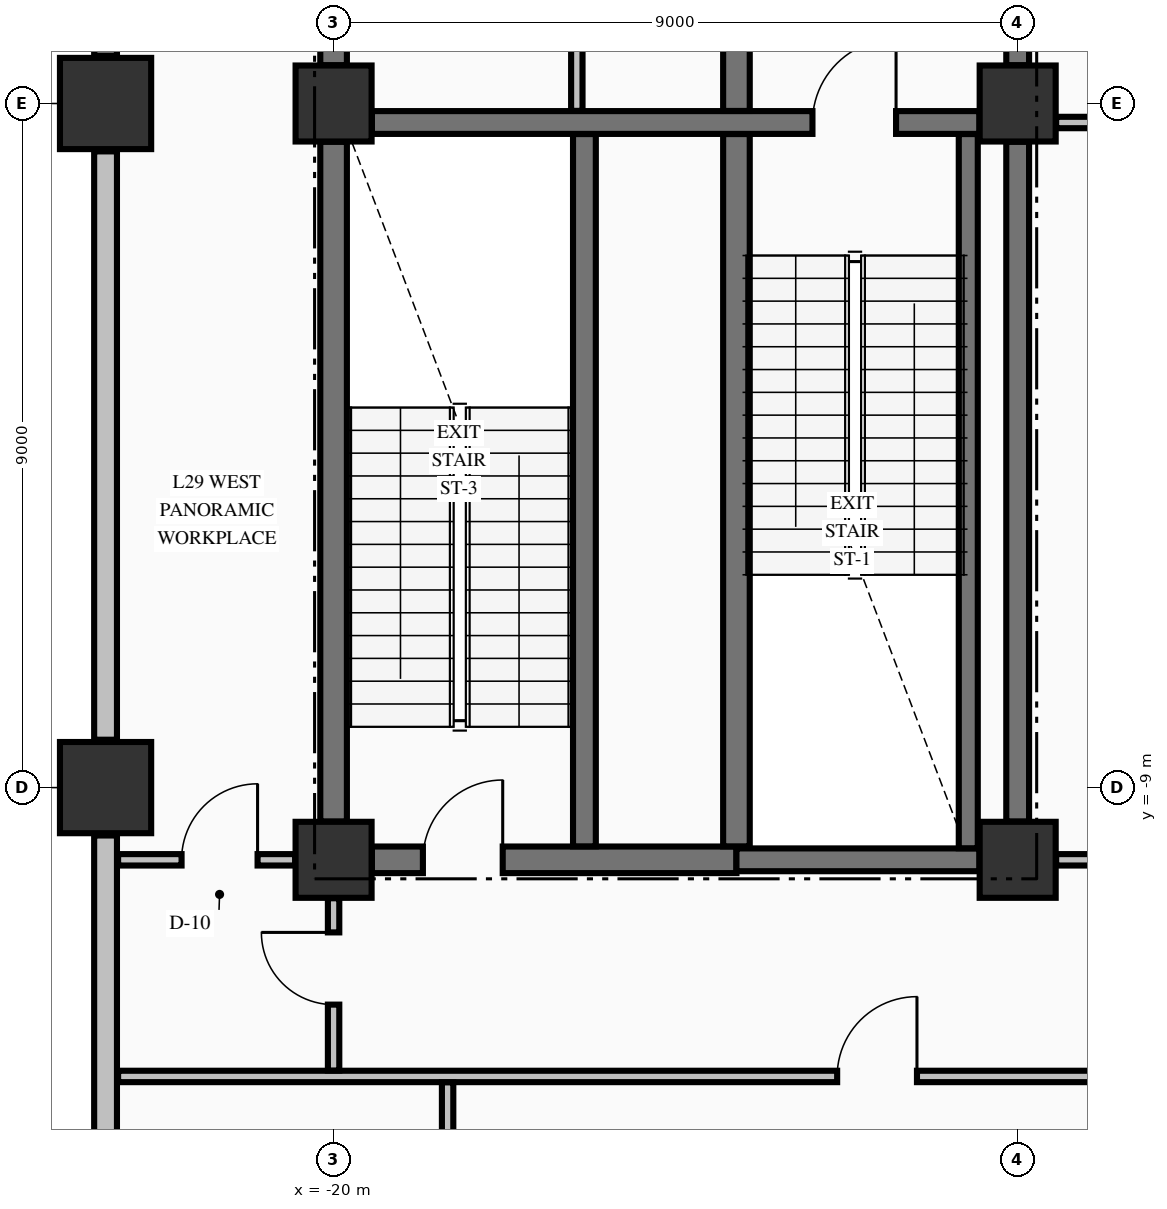
"""IFC4 building model, lengths in metres.
Left out: names, types, materials, properties, quantities, classifications, styles, units other than length and angle.
Written with IfcOpenShell. Run it as: python <this file> out.ifc"""

import sys

from ifc_helpers import new_model, si_unit, direction, frame, frame_2d, origin, origin_2d, place, context, subcontext, project, spatial, rectangle, extrude, element, fill, save


model = new_model("IFC4")
c1 = context("Model", 3, precision=1e-05, world=origin(), true_north=direction((0.0, 1.0)))
c2 = subcontext(c1, "Body", "Model", "MODEL_VIEW")
j1 = project(units=[si_unit("LENGTHUNIT", "METRE"), si_unit("PLANEANGLEUNIT", "RADIAN")], contexts=[c1])
p1 = place(None, origin())
s1 = spatial("IfcSite", under=j1, at=p1, CompositionType="ELEMENT")
p2 = place(p1, origin())
s2 = spatial("IfcBuilding", under=s1, at=p2, CompositionType="ELEMENT")
p3 = place(p2, frame((0.0, 0.0, 116.35)))
s3 = spatial("IfcBuildingStorey", under=s2, at=p3, CompositionType="ELEMENT", Elevation=116.35)
for number, where, z_axis, x_axis in (
    (1, (-23.0, -9.0, -0.425), (0.0, 0.0, 1.0), (1.0, 0.0, 0.0)),
    (2, (-23.0, 0.0, -0.425), (0.0, 0.0, 1.0), (1.0, 0.0, 0.0)),
):
    element("IfcColumn", number, at=place(p3, frame(where, z_axis=z_axis, x_axis=x_axis)), inside=s3, PredefinedType="COLUMN", context=c2, shape_type="SweptSolid", body=[
        extrude(rectangle(XDim=1.2, YDim=1.2, at=origin_2d()), origin(), (0.0, 0.0, 1.0), 5.0),
    ])
for number, where, z_axis, x_axis in (
    (3, (-20.0, -9.95, -0.425), (0.0, 0.0, 1.0), (1.0, 0.0, 0.0)),
    (4, (-11.0, -9.95, -0.425), (0.0, 0.0, 1.0), (1.0, 0.0, 0.0)),
    (5, (-11.0, 0.0, -0.425), (0.0, 0.0, 1.0), (1.0, 0.0, 0.0)),
    (6, (-20.0, 0.0, -0.425), (0.0, 0.0, 1.0), (1.0, 0.0, 0.0)),
):
    element("IfcColumn", number, at=place(p3, frame(where, z_axis=z_axis, x_axis=x_axis)), inside=s3, PredefinedType="COLUMN", context=c2, shape_type="SweptSolid", body=[
        extrude(rectangle(XDim=1.0, YDim=1.0, at=origin_2d()), origin(), (0.0, 0.0, 1.0), 5.0),
    ])
p4 = place(p3, frame((-23.0, -9.63, 0.0), z_axis=(0.0, 0.0, 1.0), x_axis=(0.0, -1.0, 0.0)))
e7 = element("IfcWall", 7, at=p4, inside=s3, PredefinedType="STANDARD", context=c2, shape_type="SweptSolid", body=[
    extrude(rectangle(XDim=10.74, YDim=0.3, at=frame_2d((5.37, 0.0))), origin(), (0.0, 0.0, 1.0), 2.167),
])
for number, where, z_axis, x_axis in (
    (8, (-23.0, -0.63, 0.0), (0.0, 0.0, 1.0), (0.0, -1.0, 0.0)),
    (9, (-23.0, 8.37, 0.0), (0.0, 0.0, 1.0), (0.0, -1.0, 0.0)),
):
    element("IfcWall", number, at=place(p3, frame(where, z_axis=z_axis, x_axis=x_axis)), inside=s3, PredefinedType="STANDARD", context=c2, shape_type="SweptSolid", body=[
        extrude(rectangle(XDim=7.74, YDim=0.3, at=frame_2d((3.87, 0.0))), origin(), (0.0, 0.0, 1.0), 2.167),
    ])
p5 = place(p3, frame((-19.496, -9.95, 0.0), z_axis=(0.0, 0.0, 1.0), x_axis=(1.0, 0.0, 0.0)))
e10 = element("IfcWall", 10, at=p5, inside=s3, PredefinedType="SHEAR", context=c2, shape_type="SweptSolid", body=[
    extrude(rectangle(XDim=4.796, YDim=0.35, at=frame_2d((2.398, 0.0))), origin(), (0.0, 0.0, 1.0), 4.575),
])
p6 = place(p5, frame((0.671, 0.0, 0.0)))
e11 = element("IfcOpeningElement", 11, at=p6, cuts=e10, PredefinedType="OPENING", context=c2, shape_type="SweptSolid", body=[
    extrude(rectangle(XDim=1.05, YDim=2.15, at=frame_2d((0.525, 1.075))), frame((0.0, 0.185, 0.0), z_axis=(0.0, -1.0, 0.0), x_axis=(1.0, 0.0, 0.0)), (0.0, 0.0, 1.0), 0.37),
])
p7 = place(p3, frame((-14.7, -9.95, 0.0), z_axis=(0.0, 0.0, 1.0), x_axis=(1.0, 0.0, 0.0)))
e12 = element("IfcWall", 12, at=p7, inside=s3, PredefinedType="SHEAR", context=c2, shape_type="SweptSolid", body=[
    extrude(rectangle(XDim=3.196, YDim=0.3, at=frame_2d((1.598, 0.0))), origin(), (0.0, 0.0, 1.0), 4.575),
])
p8 = place(p3, frame((-19.496, -0.25, 0.0), z_axis=(0.0, 0.0, 1.0), x_axis=(1.0, 0.0, 0.0)))
e13 = element("IfcWall", 13, at=p8, inside=s3, PredefinedType="SHEAR", context=c2, shape_type="SweptSolid", body=[
    extrude(rectangle(XDim=7.992, YDim=0.3, at=frame_2d((3.996, 0.0))), origin(), (0.0, 0.0, 1.0), 4.575),
])
p9 = place(p8, frame((5.796, 0.0, 0.0)))
e14 = element("IfcOpeningElement", 14, at=p9, cuts=e13, PredefinedType="OPENING", context=c2, shape_type="SweptSolid", body=[
    extrude(rectangle(XDim=1.1, YDim=2.15, at=frame_2d((0.55, 1.075))), frame((0.0, 0.16, 0.0), z_axis=(0.0, -1.0, 0.0), x_axis=(1.0, 0.0, 0.0)), (0.0, 0.0, 1.0), 0.32),
])
p10 = place(p3, frame((-22.835, -12.8, 0.0), z_axis=(0.0, 0.0, 1.0), x_axis=(1.0, 0.0, 0.0)))
e15 = element("IfcWall", 15, at=p10, inside=s3, PredefinedType="PARTITIONING", context=c2, shape_type="SweptSolid", body=[
    extrude(rectangle(XDim=50.67, YDim=0.15, at=frame_2d((25.335, 0.0))), origin(), (0.0, 0.0, 1.0), 4.575),
])
p11 = place(p10, frame((9.46, 0.0, 0.0)))
e16 = element("IfcOpeningElement", 16, at=p11, cuts=e15, PredefinedType="OPENING", context=c2, shape_type="SweptSolid", body=[
    extrude(rectangle(XDim=1.05, YDim=2.15, at=frame_2d((0.525, 1.075))), frame((0.0, 0.085, 0.0), z_axis=(0.0, -1.0, 0.0), x_axis=(1.0, 0.0, 0.0)), (0.0, 0.0, 1.0), 0.17),
])
p12 = place(p10, frame((17.86, 0.0, 0.0)))
e17 = element("IfcOpeningElement", 17, at=p12, cuts=e15, PredefinedType="OPENING", context=c2, shape_type="SweptSolid", body=[
    extrude(rectangle(XDim=0.95, YDim=2.15, at=frame_2d((0.475, 1.075))), frame((0.0, 0.085, 0.0), z_axis=(0.0, -1.0, 0.0), x_axis=(1.0, 0.0, 0.0)), (0.0, 0.0, 1.0), 0.17),
])
p13 = place(p10, frame((22.21, 0.0, 0.0)))
e18 = element("IfcOpeningElement", 18, at=p13, cuts=e15, PredefinedType="OPENING", context=c2, shape_type="SweptSolid", body=[
    extrude(rectangle(XDim=0.95, YDim=2.02, at=frame_2d((0.475, 1.01))), frame((0.0, 0.085, 0.0), z_axis=(0.0, -1.0, 0.0), x_axis=(1.0, 0.0, 0.0)), (0.0, 0.0, 1.0), 0.17),
])
p14 = place(p10, frame((31.51, 0.0, 0.0)))
e19 = element("IfcOpeningElement", 19, at=p14, cuts=e15, PredefinedType="OPENING", context=c2, shape_type="SweptSolid", body=[
    extrude(rectangle(XDim=1.05, YDim=2.15, at=frame_2d((0.525, 1.075))), frame((0.0, 0.085, 0.0), z_axis=(0.0, -1.0, 0.0), x_axis=(1.0, 0.0, 0.0)), (0.0, 0.0, 1.0), 0.17),
])
p15 = place(p10, frame((39.11, 0.0, 0.0)))
e20 = element("IfcOpeningElement", 20, at=p15, cuts=e15, PredefinedType="OPENING", context=c2, shape_type="SweptSolid", body=[
    extrude(rectangle(XDim=1.05, YDim=2.15, at=frame_2d((0.525, 1.075))), frame((0.0, 0.085, 0.0), z_axis=(0.0, -1.0, 0.0), x_axis=(1.0, 0.0, 0.0)), (0.0, 0.0, 1.0), 0.17),
])
p16 = place(p3, frame((-22.835, -9.95, 0.0), z_axis=(0.0, 0.0, 1.0), x_axis=(1.0, 0.0, 0.0)))
e21 = element("IfcWall", 21, at=p16, inside=s3, PredefinedType="PARTITIONING", context=c2, shape_type="SweptSolid", body=[
    extrude(rectangle(XDim=2.329, YDim=0.15, at=frame_2d((1.165, 0.0))), origin(), (0.0, 0.0, 1.0), 4.575),
])
p17 = place(p16, frame((0.835, 0.0, 0.0)))
e22 = element("IfcOpeningElement", 22, at=p17, cuts=e21, PredefinedType="OPENING", context=c2, shape_type="SweptSolid", body=[
    extrude(rectangle(XDim=1.0, YDim=2.15, at=frame_2d((0.5, 1.075))), frame((0.0, 0.085, 0.0), z_axis=(0.0, -1.0, 0.0), x_axis=(1.0, 0.0, 0.0)), (0.0, 0.0, 1.0), 0.17),
])
p18 = place(p3, frame((-10.494, -9.95, 0.0), z_axis=(0.0, 0.0, 1.0), x_axis=(1.0, 0.0, 0.0)))
e23 = element("IfcWall", 23, at=p18, inside=s3, PredefinedType="PARTITIONING", context=c2, shape_type="SweptSolid", body=[
    extrude(rectangle(XDim=20.988, YDim=0.15, at=frame_2d((10.494, 0.0))), origin(), (0.0, 0.0, 1.0), 4.575),
])
p19 = place(p18, frame((15.394, 0.0, 0.0)))
e24 = element("IfcOpeningElement", 24, at=p19, cuts=e23, PredefinedType="OPENING", context=c2, shape_type="SweptSolid", body=[
    extrude(rectangle(XDim=1.1, YDim=2.15, at=frame_2d((0.55, 1.075))), frame((0.0, 0.085, 0.0), z_axis=(0.0, -1.0, 0.0), x_axis=(1.0, 0.0, 0.0)), (0.0, 0.0, 1.0), 0.17),
])
p20 = place(p18, frame((19.888, 0.0, 0.0)))
e25 = element("IfcOpeningElement", 25, at=p20, cuts=e23, PredefinedType="OPENING", context=c2, shape_type="SweptSolid", body=[
    extrude(rectangle(XDim=0.95, YDim=2.02, at=frame_2d((0.475, 1.01))), frame((0.0, 0.085, 0.0), z_axis=(0.0, -1.0, 0.0), x_axis=(1.0, 0.0, 0.0)), (0.0, 0.0, 1.0), 0.17),
])
p21 = place(p3, frame((-10.494, -0.25, 0.0), z_axis=(0.0, 0.0, 1.0), x_axis=(1.0, 0.0, 0.0)))
e26 = element("IfcWall", 26, at=p21, inside=s3, PredefinedType="PARTITIONING", context=c2, shape_type="SweptSolid", body=[
    extrude(rectangle(XDim=20.988, YDim=0.15, at=frame_2d((10.494, 0.0))), origin(), (0.0, 0.0, 1.0), 4.575),
])
p22 = place(p21, frame((15.394, 0.0, 0.0)))
e27 = element("IfcOpeningElement", 27, at=p22, cuts=e26, PredefinedType="OPENING", context=c2, shape_type="SweptSolid", body=[
    extrude(rectangle(XDim=1.1, YDim=2.15, at=frame_2d((0.55, 1.075))), frame((0.0, 0.085, 0.0), z_axis=(0.0, -1.0, 0.0), x_axis=(1.0, 0.0, 0.0)), (0.0, 0.0, 1.0), 0.17),
])
p23 = place(p21, frame((6.639, 0.0, 0.0)))
e28 = element("IfcOpeningElement", 28, at=p23, cuts=e26, PredefinedType="OPENING", context=c2, shape_type="SweptSolid", body=[
    extrude(rectangle(XDim=1.05, YDim=2.15, at=frame_2d((0.525, 1.075))), frame((0.0, 0.085, 0.0), z_axis=(0.0, -1.0, 0.0), x_axis=(1.0, 0.0, 0.0)), (0.0, 0.0, 1.0), 0.17),
])
p24 = place(p21, frame((18.799, 0.0, 0.0)))
e29 = element("IfcOpeningElement", 29, at=p24, cuts=e26, PredefinedType="OPENING", context=c2, shape_type="SweptSolid", body=[
    extrude(rectangle(XDim=0.95, YDim=2.15, at=frame_2d((0.475, 1.075))), frame((0.0, 0.085, 0.0), z_axis=(0.0, -1.0, 0.0), x_axis=(1.0, 0.0, 0.0)), (0.0, 0.0, 1.0), 0.17),
])
p25 = place(p3, frame((-20.0, -9.446, 0.0), z_axis=(0.0, 0.0, 1.0), x_axis=(0.0, 1.0, 0.0)))
e30 = element("IfcWall", 30, at=p25, inside=s3, PredefinedType="SHEAR", context=c2, shape_type="SweptSolid", body=[
    extrude(rectangle(XDim=8.942, YDim=0.35, at=frame_2d((4.471, 0.0))), origin(), (0.0, 0.0, 1.0), 4.575),
])
p26 = place(p3, frame((-20.0, 0.504, 0.0), z_axis=(0.0, 0.0, 1.0), x_axis=(0.0, 1.0, 0.0)))
e31 = element("IfcWall", 31, at=p26, inside=s3, PredefinedType="SHEAR", context=c2, shape_type="SweptSolid", body=[
    extrude(rectangle(XDim=9.492, YDim=0.35, at=frame_2d((4.746, 0.0))), origin(), (0.0, 0.0, 1.0), 4.575),
])
p27 = place(p3, frame((-16.7, -9.773, 0.0), z_axis=(0.0, 0.0, 1.0), x_axis=(0.0, 1.0, 0.0)))
e32 = element("IfcWall", 32, at=p27, inside=s3, PredefinedType="SHEAR", context=c2, shape_type="SweptSolid", body=[
    extrude(rectangle(XDim=9.371, YDim=0.3, at=frame_2d((4.686, 0.0))), origin(), (0.0, 0.0, 1.0), 4.575),
])
p28 = place(p3, frame((-14.7, -9.773, 0.0), z_axis=(0.0, 0.0, 1.0), x_axis=(0.0, 1.0, 0.0)))
e33 = element("IfcWall", 33, at=p28, inside=s3, PredefinedType="SHEAR", context=c2, shape_type="SweptSolid", body=[
    extrude(rectangle(XDim=9.371, YDim=0.35, at=frame_2d((4.686, 0.0))), origin(), (0.0, 0.0, 1.0), 4.575),
])
p29 = place(p3, frame((-14.7, -0.098, 0.0), z_axis=(0.0, 0.0, 1.0), x_axis=(0.0, 1.0, 0.0)))
e34 = element("IfcWall", 34, at=p29, inside=s3, PredefinedType="SHEAR", context=c2, shape_type="SweptSolid", body=[
    extrude(rectangle(XDim=2.846, YDim=0.35, at=frame_2d((1.423, 0.0))), origin(), (0.0, 0.0, 1.0), 4.575),
])
p30 = place(p3, frame((-11.65, -9.798, 0.0), z_axis=(0.0, 0.0, 1.0), x_axis=(0.0, 1.0, 0.0)))
e35 = element("IfcWall", 35, at=p30, inside=s3, PredefinedType="SOLIDWALL", context=c2, shape_type="SweptSolid", body=[
    extrude(rectangle(XDim=9.396, YDim=0.25, at=frame_2d((4.698, 0.0))), origin(), (0.0, 0.0, 1.0), 4.575),
])
p31 = place(p3, frame((-11.0, -9.446, 0.0), z_axis=(0.0, 0.0, 1.0), x_axis=(0.0, 1.0, 0.0)))
e36 = element("IfcWall", 36, at=p31, inside=s3, PredefinedType="SHEAR", context=c2, shape_type="SweptSolid", body=[
    extrude(rectangle(XDim=8.942, YDim=0.3, at=frame_2d((4.471, 0.0))), origin(), (0.0, 0.0, 1.0), 4.575),
])
p32 = place(p3, frame((-11.0, 0.504, 0.0), z_axis=(0.0, 0.0, 1.0), x_axis=(0.0, 1.0, 0.0)))
e37 = element("IfcWall", 37, at=p32, inside=s3, PredefinedType="SHEAR", context=c2, shape_type="SweptSolid", body=[
    extrude(rectangle(XDim=2.244, YDim=0.3, at=frame_2d((1.122, 0.0))), origin(), (0.0, 0.0, 1.0), 4.575),
])
p33 = place(p32, frame((0.596, 0.0, 0.0)))
e38 = element("IfcOpeningElement", 38, at=p33, cuts=e37, PredefinedType="OPENING", context=c2, shape_type="SweptSolid", body=[
    extrude(rectangle(XDim=1.1, YDim=2.15, at=frame_2d((0.55, 1.075))), frame((0.0, 0.16, 0.0), z_axis=(0.0, -1.0, 0.0), x_axis=(1.0, 0.0, 0.0)), (0.0, 0.0, 1.0), 0.32),
])
p34 = place(p3, frame((-20.0, -12.722, 0.0), z_axis=(0.0, 0.0, 1.0), x_axis=(0.0, 1.0, 0.0)))
e39 = element("IfcWall", 39, at=p34, inside=s3, PredefinedType="PARTITIONING", context=c2, shape_type="SweptSolid", body=[
    extrude(rectangle(XDim=2.266, YDim=0.15, at=frame_2d((1.133, 0.0))), origin(), (0.0, 0.0, 1.0), 4.065),
])
p35 = place(p34, frame((0.867, 0.0, 0.0)))
e40 = element("IfcOpeningElement", 40, at=p35, cuts=e39, PredefinedType="OPENING", context=c2, shape_type="SweptSolid", body=[
    extrude(rectangle(XDim=0.95, YDim=2.02, at=frame_2d((0.475, 1.01))), frame((0.0, 0.085, 0.0), z_axis=(0.0, -1.0, 0.0), x_axis=(1.0, 0.0, 0.0)), (0.0, 0.0, 1.0), 0.17),
])
p36 = place(p3, frame((-18.5, -20.394, 0.0), z_axis=(0.0, 0.0, 1.0), x_axis=(0.0, 1.0, 0.0)))
e41 = element("IfcWall", 41, at=p36, inside=s3, PredefinedType="PARTITIONING", context=c2, shape_type="SweptSolid", body=[
    extrude(rectangle(XDim=7.516, YDim=0.15, at=frame_2d((3.758, 0.0))), origin(), (0.0, 0.0, 1.0), 4.575),
])
p37 = place(p3, frame((-16.8, -0.097, 0.0), z_axis=(0.0, 0.0, 1.0), x_axis=(0.0, 1.0, 0.0)))
e42 = element("IfcWall", 42, at=p37, inside=s3, PredefinedType="PARTITIONING", context=c2, shape_type="SweptSolid", body=[
    extrude(rectangle(XDim=4.819, YDim=0.15, at=frame_2d((2.409, 0.0))), origin(), (0.0, 0.0, 1.0), 4.575),
])
p38 = place(p9, origin())
e43 = element("IfcDoor", 43, at=p38, inside=s3, OperationType="SINGLE_SWING_RIGHT", PredefinedType="DOOR", context=c2, shape_type="SweptSolid", body=[
    extrude(rectangle(XDim=1.1, YDim=2.15, at=frame_2d((0.55, 1.075))), frame((0.0, 0.025, 0.0), z_axis=(0.0, -1.0, 0.0), x_axis=(1.0, 0.0, 0.0)), (0.0, 0.0, 1.0), 0.05),
])
fill(e14, e43)
p39 = place(p6, origin())
e44 = element("IfcDoor", 44, at=p39, inside=s3, OperationType="SINGLE_SWING_RIGHT", PredefinedType="DOOR", context=c2, shape_type="SweptSolid", body=[
    extrude(rectangle(XDim=1.05, YDim=2.15, at=frame_2d((0.525, 1.075))), frame((0.0, 0.025, 0.0), z_axis=(0.0, -1.0, 0.0), x_axis=(1.0, 0.0, 0.0)), (0.0, 0.0, 1.0), 0.05),
])
fill(e11, e44)
p40 = place(p11, origin())
e45 = element("IfcDoor", 45, at=p40, inside=s3, OperationType="SINGLE_SWING_RIGHT", PredefinedType="DOOR", context=c2, shape_type="SweptSolid", body=[
    extrude(rectangle(XDim=1.05, YDim=2.15, at=frame_2d((0.525, 1.075))), frame((0.0, 0.025, 0.0), z_axis=(0.0, -1.0, 0.0), x_axis=(1.0, 0.0, 0.0)), (0.0, 0.0, 1.0), 0.05),
])
fill(e16, e45)
p41 = place(p35, origin())
e46 = element("IfcDoor", 46, at=p41, inside=s3, OperationType="SINGLE_SWING_RIGHT", PredefinedType="DOOR", context=c2, shape_type="SweptSolid", body=[
    extrude(rectangle(XDim=0.95, YDim=2.02, at=frame_2d((0.475, 1.01))), frame((0.0, 0.025, 0.0), z_axis=(0.0, -1.0, 0.0), x_axis=(1.0, 0.0, 0.0)), (0.0, 0.0, 1.0), 0.05),
])
fill(e40, e46)
p42 = place(p17, origin())
e47 = element("IfcDoor", 47, at=p42, inside=s3, OperationType="SINGLE_SWING_RIGHT", PredefinedType="DOOR", context=c2, shape_type="SweptSolid", body=[
    extrude(rectangle(XDim=1.0, YDim=2.15, at=frame_2d((0.5, 1.075))), frame((0.0, 0.025, 0.0), z_axis=(0.0, -1.0, 0.0), x_axis=(1.0, 0.0, 0.0)), (0.0, 0.0, 1.0), 0.05),
])
fill(e22, e47)
save(model, sys.argv[1])
